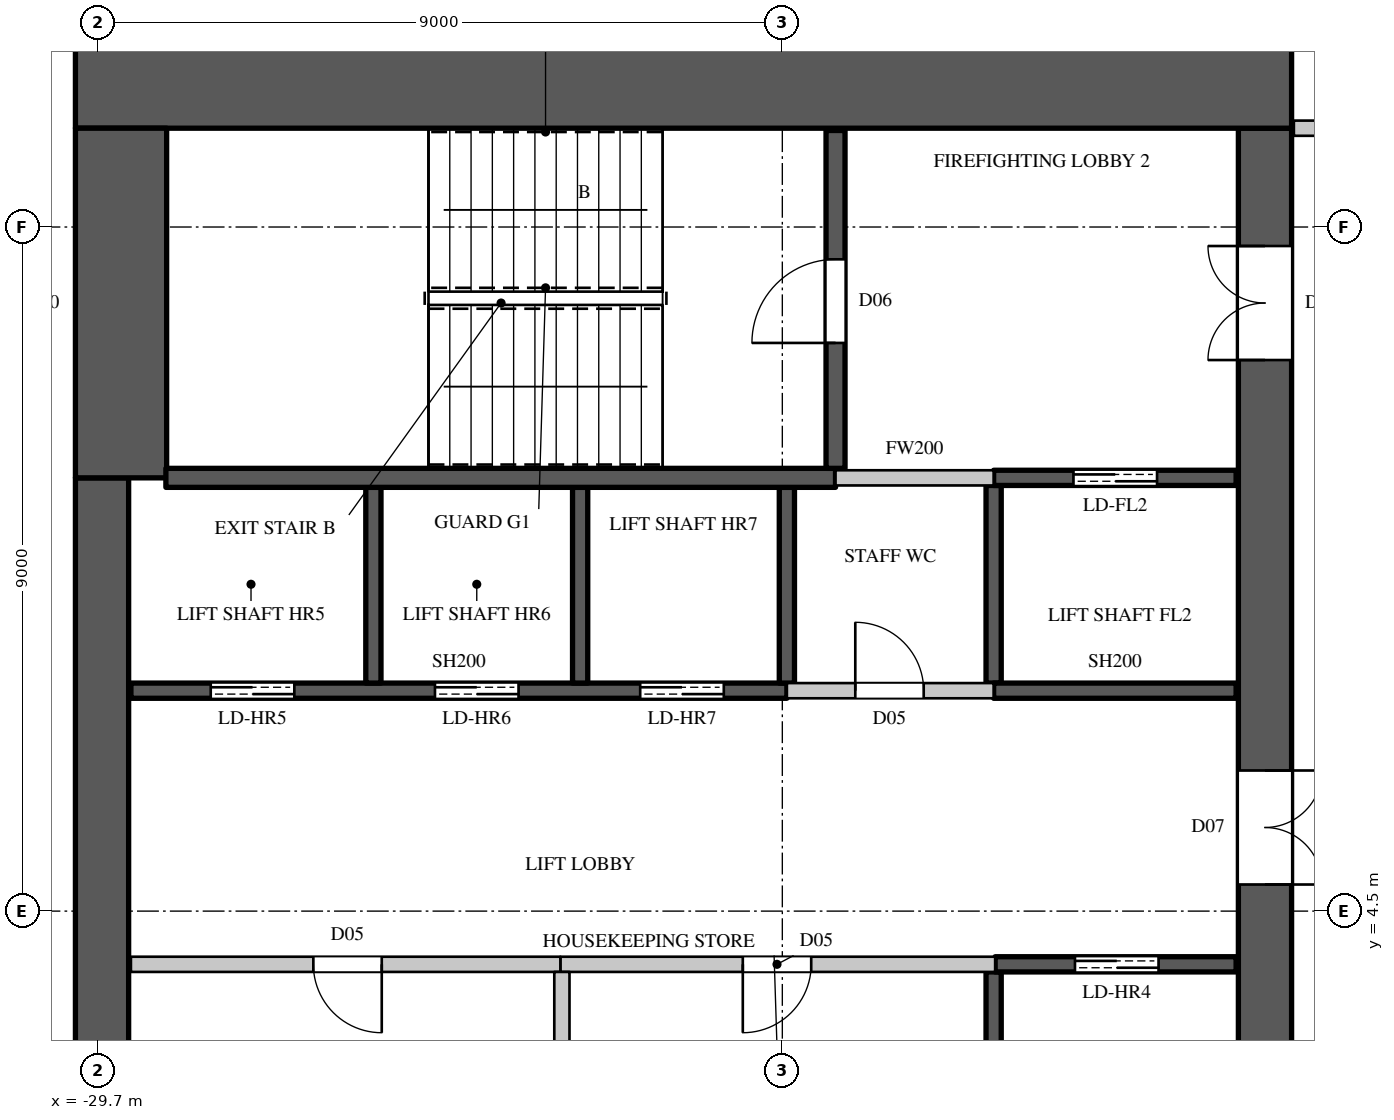
"""IFC4 building model, lengths in metres.
Left out: names, types, materials, properties, quantities, classifications, styles, units other than length and angle.
Written with IfcOpenShell. Run it as: python <this file> out.ifc"""

import sys

from ifc_helpers import new_model, si_unit, direction, frame, frame_2d, origin, place, context, subcontext, project, spatial, rectangle, extrude, element, fill, save


model = new_model("IFC4")
c1 = context("Model", 3, precision=1e-05, world=origin(), true_north=direction((0.0, 1.0)))
c2 = subcontext(c1, "Body", "Model", "MODEL_VIEW")
j1 = project(units=[si_unit("LENGTHUNIT", "METRE"), si_unit("PLANEANGLEUNIT", "RADIAN")], contexts=[c1])
p1 = place(None, origin())
s1 = spatial("IfcSite", under=j1, at=p1, CompositionType="ELEMENT")
p2 = place(p1, origin())
s2 = spatial("IfcBuilding", under=s1, at=p2, CompositionType="ELEMENT")
p3 = place(p2, frame((0.0, 0.0, 292.6)))
s3 = spatial("IfcBuildingStorey", under=s2, at=p3, CompositionType="ELEMENT", Elevation=292.6)
p4 = place(p3, frame((-30.0, 15.4, 0.0), z_axis=(0.0, 0.0, 1.0), x_axis=(1.0, 0.0, 0.0)))
e1 = element("IfcWall", 1, at=p4, inside=s3, PredefinedType="SHEAR", context=c2, shape_type="SweptSolid", body=[
    extrude(rectangle(XDim=16.0, YDim=1.2, at=frame_2d((8.0, 0.0))), origin(), (0.0, 0.0, 1.0), 4.1),
])
p5 = place(p3, frame((-14.35, -14.8, 0.0), z_axis=(0.0, 0.0, 1.0), x_axis=(0.0, 1.0, 0.0)))
e2 = element("IfcWall", 2, at=p5, inside=s3, PredefinedType="SHEAR", context=c2, shape_type="SweptSolid", body=[
    extrude(rectangle(XDim=29.6, YDim=0.7, at=frame_2d((14.8, 0.0))), origin(), (0.0, 0.0, 1.0), 4.1),
])
p6 = place(p5, frame((1.55, 0.0, 0.0)))
e3 = element("IfcOpeningElement", 3, at=p6, cuts=e2, PredefinedType="OPENING", context=c2, shape_type="SweptSolid", body=[
    extrude(rectangle(XDim=1.5, YDim=2.4, at=frame_2d((0.75, 1.2))), frame((0.0, 0.36, 0.0), z_axis=(0.0, -1.0, 0.0), x_axis=(1.0, 0.0, 0.0)), (0.0, 0.0, 1.0), 0.72),
])
p7 = place(p5, frame((26.55, 0.0, 0.0)))
e4 = element("IfcOpeningElement", 4, at=p7, cuts=e2, PredefinedType="OPENING", context=c2, shape_type="SweptSolid", body=[
    extrude(rectangle(XDim=1.5, YDim=2.4, at=frame_2d((0.75, 1.2))), frame((0.0, 0.36, 0.0), z_axis=(0.0, -1.0, 0.0), x_axis=(1.0, 0.0, 0.0)), (0.0, 0.0, 1.0), 0.72),
])
p8 = place(p5, frame((8.45, 0.0, 0.0)))
e5 = element("IfcOpeningElement", 5, at=p8, cuts=e2, PredefinedType="OPENING", context=c2, shape_type="SweptSolid", body=[
    extrude(rectangle(XDim=1.5, YDim=2.4, at=frame_2d((0.75, 1.2))), frame((0.0, 0.36, 0.0), z_axis=(0.0, -1.0, 0.0), x_axis=(1.0, 0.0, 0.0)), (0.0, 0.0, 1.0), 0.72),
])
p9 = place(p5, frame((19.65, 0.0, 0.0)))
e6 = element("IfcOpeningElement", 6, at=p9, cuts=e2, PredefinedType="OPENING", context=c2, shape_type="SweptSolid", body=[
    extrude(rectangle(XDim=1.5, YDim=2.4, at=frame_2d((0.75, 1.2))), frame((0.0, 0.36, 0.0), z_axis=(0.0, -1.0, 0.0), x_axis=(1.0, 0.0, 0.0)), (0.0, 0.0, 1.0), 0.72),
])
p10 = place(p5, frame((14.5, 0.0, 0.0)))
e7 = element("IfcOpeningElement", 7, at=p10, cuts=e2, PredefinedType="OPENING", context=c2, shape_type="SweptSolid", body=[
    extrude(rectangle(XDim=0.6, YDim=2.0, at=frame_2d((0.3, 1.0))), frame((0.0, 0.36, 0.0), z_axis=(0.0, -1.0, 0.0), x_axis=(1.0, 0.0, 0.0)), (0.0, 0.0, 1.0), 0.72),
])
p11 = place(p3, frame((-29.65, -10.2, 0.0), z_axis=(0.0, 0.0, 1.0), x_axis=(0.0, 1.0, 0.0)))
e8 = element("IfcWall", 8, at=p11, inside=s3, PredefinedType="SHEAR", context=c2, shape_type="SweptSolid", body=[
    extrude(rectangle(XDim=20.4, YDim=0.7, at=frame_2d((10.2, 0.0))), origin(), (0.0, 0.0, 1.0), 4.1),
])
p12 = place(p3, frame((-29.4, 10.2, 0.0), z_axis=(0.0, 0.0, 1.0), x_axis=(0.0, 1.0, 0.0)))
e9 = element("IfcWall", 9, at=p12, inside=s3, PredefinedType="SHEAR", context=c2, shape_type="SweptSolid", body=[
    extrude(rectangle(XDim=4.6, YDim=1.2, at=frame_2d((2.3, 0.0))), origin(), (0.0, 0.0, 1.0), 4.1),
])
p13 = place(p3, frame((-23.62, 3.8, 0.0), z_axis=(0.0, 0.0, 1.0), x_axis=(1.0, 0.0, 0.0)))
e10 = element("IfcWall", 10, at=p13, inside=s3, PredefinedType="PARTITIONING", context=c2, shape_type="SweptSolid", body=[
    extrude(rectangle(XDim=5.72, YDim=0.2, at=frame_2d((2.86, 0.0))), origin(), (0.0, 0.0, 1.0), 3.8),
])
p14 = place(p13, frame((2.4, 0.0, 0.0)))
e11 = element("IfcOpeningElement", 11, at=p14, cuts=e10, PredefinedType="OPENING", context=c2, shape_type="SweptSolid", body=[
    extrude(rectangle(XDim=0.9, YDim=2.2, at=frame_2d((0.45, 1.1))), frame((0.0, 0.11, 0.0), z_axis=(0.0, -1.0, 0.0), x_axis=(1.0, 0.0, 0.0)), (0.0, 0.0, 1.0), 0.22),
])
p15 = place(p3, frame((-20.64, 7.4, 0.0), z_axis=(0.0, 0.0, 1.0), x_axis=(1.0, 0.0, 0.0)))
e12 = element("IfcWall", 12, at=p15, inside=s3, PredefinedType="PARTITIONING", context=c2, shape_type="SweptSolid", body=[
    extrude(rectangle(XDim=2.72, YDim=0.2, at=frame_2d((1.36, 0.0))), origin(), (0.0, 0.0, 1.0), 3.8),
])
p16 = place(p15, frame((0.9, 0.0, 0.0)))
e13 = element("IfcOpeningElement", 13, at=p16, cuts=e12, PredefinedType="OPENING", context=c2, shape_type="SweptSolid", body=[
    extrude(rectangle(XDim=0.9, YDim=2.2, at=frame_2d((0.45, 1.1))), frame((0.0, 0.11, 0.0), z_axis=(0.0, -1.0, 0.0), x_axis=(1.0, 0.0, 0.0)), (0.0, 0.0, 1.0), 0.22),
])
p17 = place(p3, frame((-20.0, 10.2, 0.0), z_axis=(0.0, 0.0, 1.0), x_axis=(1.0, 0.0, 0.0)))
e14 = element("IfcWall", 14, at=p17, inside=s3, PredefinedType="PARTITIONING", context=c2, shape_type="SweptSolid", body=[
    extrude(rectangle(XDim=2.08, YDim=0.2, at=frame_2d((1.04, 0.0))), origin(), (0.0, 0.0, 1.0), 3.8),
])
p18 = place(p3, frame((-13.97, 14.8, 0.0), z_axis=(0.0, 0.0, 1.0), x_axis=(1.0, 0.0, 0.0)))
e15 = element("IfcWall", 15, at=p18, inside=s3, PredefinedType="PARTITIONING", context=c2, shape_type="SweptSolid", body=[
    extrude(rectangle(XDim=3.07, YDim=0.2, at=frame_2d((1.535, 0.0))), origin(), (0.0, 0.0, 1.0), 3.8),
])
p19 = place(p3, frame((-29.27, 3.8, 0.0), z_axis=(0.0, 0.0, 1.0), x_axis=(1.0, 0.0, 0.0)))
e16 = element("IfcWall", 16, at=p19, inside=s3, PredefinedType="PARTITIONING", context=c2, shape_type="SweptSolid", body=[
    extrude(rectangle(XDim=5.65, YDim=0.2, at=frame_2d((2.825, 0.0))), origin(), (0.0, 0.0, 1.0), 3.8),
])
p20 = place(p19, frame((2.4, 0.0, 0.0)))
e17 = element("IfcOpeningElement", 17, at=p20, cuts=e16, PredefinedType="OPENING", context=c2, shape_type="SweptSolid", body=[
    extrude(rectangle(XDim=0.9, YDim=2.2, at=frame_2d((0.45, 1.1))), frame((0.0, 0.11, 0.0), z_axis=(0.0, -1.0, 0.0), x_axis=(1.0, 0.0, 0.0)), (0.0, 0.0, 1.0), 0.22),
])
p21 = place(p3, frame((-23.6, 1.1, 0.0), z_axis=(0.0, 0.0, 1.0), x_axis=(0.0, 1.0, 0.0)))
e18 = element("IfcWall", 18, at=p21, inside=s3, PredefinedType="PARTITIONING", context=c2, shape_type="SweptSolid", body=[
    extrude(rectangle(XDim=2.6, YDim=0.2, at=frame_2d((1.3, 0.0))), origin(), (0.0, 0.0, 1.0), 3.8),
])
p22 = place(p3, frame((-29.27, 7.4, 0.0), z_axis=(0.0, 0.0, 1.0), x_axis=(1.0, 0.0, 0.0)))
e19 = element("IfcWall", 19, at=p22, inside=s3, PredefinedType="SHEAR", context=c2, shape_type="SweptSolid", body=[
    extrude(rectangle(XDim=8.63, YDim=0.2, at=frame_2d((4.315, 0.0))), origin(), (0.0, 0.0, 1.0), 3.8),
])
p23 = place(p22, frame((1.05, 0.0, 0.0)))
e20 = element("IfcOpeningElement", 20, at=p23, cuts=e19, PredefinedType="OPENING", context=c2, shape_type="SweptSolid", body=[
    extrude(rectangle(XDim=1.1, YDim=2.2, at=frame_2d((0.55, 1.1))), frame((0.0, 0.11, 0.0), z_axis=(0.0, -1.0, 0.0), x_axis=(1.0, 0.0, 0.0)), (0.0, 0.0, 1.0), 0.22),
])
p24 = place(p22, frame((4.0, 0.0, 0.0)))
e21 = element("IfcOpeningElement", 21, at=p24, cuts=e19, PredefinedType="OPENING", context=c2, shape_type="SweptSolid", body=[
    extrude(rectangle(XDim=1.1, YDim=2.2, at=frame_2d((0.55, 1.1))), frame((0.0, 0.11, 0.0), z_axis=(0.0, -1.0, 0.0), x_axis=(1.0, 0.0, 0.0)), (0.0, 0.0, 1.0), 0.22),
])
p25 = place(p22, frame((6.7, 0.0, 0.0)))
e22 = element("IfcOpeningElement", 22, at=p25, cuts=e19, PredefinedType="OPENING", context=c2, shape_type="SweptSolid", body=[
    extrude(rectangle(XDim=1.1, YDim=2.2, at=frame_2d((0.55, 1.1))), frame((0.0, 0.11, 0.0), z_axis=(0.0, -1.0, 0.0), x_axis=(1.0, 0.0, 0.0)), (0.0, 0.0, 1.0), 0.22),
])
for number, where, z_axis, x_axis in (
    (23, (-26.08, 7.5, 0.0), (0.0, 0.0, 1.0), (0.0, 1.0, 0.0)),
    (24, (-23.36, 7.5, 0.0), (0.0, 0.0, 1.0), (0.0, 1.0, 0.0)),
):
    element("IfcWall", number, at=place(p3, frame(where, z_axis=z_axis, x_axis=x_axis)), inside=s3, PredefinedType="SHEAR", context=c2, shape_type="SweptSolid", body=[
        extrude(rectangle(XDim=2.575, YDim=0.2, at=frame_2d((1.288, 0.0))), origin(), (0.0, 0.0, 1.0), 4.1),
    ])
p26 = place(p3, frame((-20.64, 7.5, 0.0), z_axis=(0.0, 0.0, 1.0), x_axis=(0.0, 1.0, 0.0)))
e25 = element("IfcWall", 25, at=p26, inside=s3, PredefinedType="SHEAR", context=c2, shape_type="SweptSolid", body=[
    extrude(rectangle(XDim=2.575, YDim=0.2, at=frame_2d((1.288, 0.0))), origin(), (0.0, 0.0, 1.0), 3.8),
])
p27 = place(p3, frame((-17.92, 1.1, 0.0), z_axis=(0.0, 0.0, 1.0), x_axis=(0.0, 1.0, 0.0)))
e26 = element("IfcWall", 26, at=p27, inside=s3, PredefinedType="SHEAR", context=c2, shape_type="SweptSolid", body=[
    extrude(rectangle(XDim=2.6, YDim=0.2, at=frame_2d((1.3, 0.0))), origin(), (0.0, 0.0, 1.0), 3.8),
])
p28 = place(p3, frame((-17.9, 3.8, 0.0), z_axis=(0.0, 0.0, 1.0), x_axis=(1.0, 0.0, 0.0)))
e27 = element("IfcWall", 27, at=p28, inside=s3, PredefinedType="SHEAR", context=c2, shape_type="SweptSolid", body=[
    extrude(rectangle(XDim=3.17, YDim=0.2, at=frame_2d((1.585, 0.0))), origin(), (0.0, 0.0, 1.0), 3.8),
])
p29 = place(p28, frame((1.05, 0.0, 0.0)))
e28 = element("IfcOpeningElement", 28, at=p29, cuts=e27, PredefinedType="OPENING", context=c2, shape_type="SweptSolid", body=[
    extrude(rectangle(XDim=1.1, YDim=2.2, at=frame_2d((0.55, 1.1))), frame((0.0, 0.11, 0.0), z_axis=(0.0, -1.0, 0.0), x_axis=(1.0, 0.0, 0.0)), (0.0, 0.0, 1.0), 0.22),
])
p30 = place(p3, frame((-17.92, 7.5, 0.0), z_axis=(0.0, 0.0, 1.0), x_axis=(0.0, 1.0, 0.0)))
e29 = element("IfcWall", 29, at=p30, inside=s3, PredefinedType="SHEAR", context=c2, shape_type="SweptSolid", body=[
    extrude(rectangle(XDim=2.6, YDim=0.2, at=frame_2d((1.3, 0.0))), origin(), (0.0, 0.0, 1.0), 3.8),
])
p31 = place(p3, frame((-17.92, 7.4, 0.0), z_axis=(0.0, 0.0, 1.0), x_axis=(1.0, 0.0, 0.0)))
e30 = element("IfcWall", 30, at=p31, inside=s3, PredefinedType="SHEAR", context=c2, shape_type="SweptSolid", body=[
    extrude(rectangle(XDim=3.19, YDim=0.2, at=frame_2d((1.595, 0.0))), origin(), (0.0, 0.0, 1.0), 3.8),
])
p32 = place(p3, frame((-17.92, 10.2, 0.0), z_axis=(0.0, 0.0, 1.0), x_axis=(1.0, 0.0, 0.0)))
e31 = element("IfcWall", 31, at=p32, inside=s3, PredefinedType="SHEAR", context=c2, shape_type="SweptSolid", body=[
    extrude(rectangle(XDim=3.19, YDim=0.2, at=frame_2d((1.595, 0.0))), origin(), (0.0, 0.0, 1.0), 3.8),
])
p33 = place(p32, frame((1.05, 0.0, 0.0)))
e32 = element("IfcOpeningElement", 32, at=p33, cuts=e31, PredefinedType="OPENING", context=c2, shape_type="SweptSolid", body=[
    extrude(rectangle(XDim=1.1, YDim=2.2, at=frame_2d((0.55, 1.1))), frame((0.0, 0.11, 0.0), z_axis=(0.0, -1.0, 0.0), x_axis=(1.0, 0.0, 0.0)), (0.0, 0.0, 1.0), 0.22),
])
p34 = place(p3, frame((-28.81, 10.2, 0.0), z_axis=(0.0, 0.0, 1.0), x_axis=(1.0, 0.0, 0.0)))
e33 = element("IfcWall", 33, at=p34, inside=s3, PredefinedType="SHEAR", context=c2, shape_type="SweptSolid", body=[
    extrude(rectangle(XDim=8.81, YDim=0.25, at=frame_2d((4.405, 0.0))), origin(), (0.0, 0.0, 1.0), 3.8),
])
p35 = place(p3, frame((-20.0, 10.325, 0.0), z_axis=(0.0, 0.0, 1.0), x_axis=(0.0, 1.0, 0.0)))
e34 = element("IfcWall", 34, at=p35, inside=s3, PredefinedType="SHEAR", context=c2, shape_type="SweptSolid", body=[
    extrude(rectangle(XDim=4.445, YDim=0.25, at=frame_2d((2.223, 0.0))), origin(), (0.0, 0.0, 1.0), 3.8),
])
p36 = place(p35, frame((1.65, 0.0, 0.0)))
e35 = element("IfcOpeningElement", 35, at=p36, cuts=e34, PredefinedType="OPENING", context=c2, shape_type="SweptSolid", body=[
    extrude(rectangle(XDim=1.1, YDim=2.2, at=frame_2d((0.55, 1.1))), frame((0.0, 0.135, 0.0), z_axis=(0.0, -1.0, 0.0), x_axis=(1.0, 0.0, 0.0)), (0.0, 0.0, 1.0), 0.27),
])
p37 = place(p36, origin())
e36 = element("IfcDoor", 36, at=p37, inside=s3, OperationType="SINGLE_SWING_LEFT", PredefinedType="DOOR", context=c2, shape_type="SweptSolid", body=[
    extrude(rectangle(XDim=1.1, YDim=2.2, at=frame_2d((0.55, 1.1))), frame((0.0, 0.025, 0.0), z_axis=(0.0, -1.0, 0.0), x_axis=(1.0, 0.0, 0.0)), (0.0, 0.0, 1.0), 0.05),
])
fill(e35, e36)
p38 = place(p20, origin())
e37 = element("IfcDoor", 37, at=p38, inside=s3, OperationType="SINGLE_SWING_LEFT", PredefinedType="DOOR", context=c2, shape_type="SweptSolid", body=[
    extrude(rectangle(XDim=0.9, YDim=2.2, at=frame_2d((0.45, 1.1))), frame((0.0, 0.025, 0.0), z_axis=(0.0, -1.0, 0.0), x_axis=(1.0, 0.0, 0.0)), (0.0, 0.0, 1.0), 0.05),
])
fill(e17, e37)
p39 = place(p14, origin())
e38 = element("IfcDoor", 38, at=p39, inside=s3, OperationType="SINGLE_SWING_RIGHT", PredefinedType="DOOR", context=c2, shape_type="SweptSolid", body=[
    extrude(rectangle(XDim=0.9, YDim=2.2, at=frame_2d((0.45, 1.1))), frame((0.0, 0.025, 0.0), z_axis=(0.0, -1.0, 0.0), x_axis=(1.0, 0.0, 0.0)), (0.0, 0.0, 1.0), 0.05),
])
fill(e11, e38)
p40 = place(p16, origin())
e39 = element("IfcDoor", 39, at=p40, inside=s3, OperationType="SINGLE_SWING_LEFT", PredefinedType="DOOR", context=c2, shape_type="SweptSolid", body=[
    extrude(rectangle(XDim=0.9, YDim=2.2, at=frame_2d((0.45, 1.1))), frame((0.0, 0.025, 0.0), z_axis=(0.0, -1.0, 0.0), x_axis=(1.0, 0.0, 0.0)), (0.0, 0.0, 1.0), 0.05),
])
fill(e13, e39)
p41 = place(p29, origin())
e40 = element("IfcDoor", 40, at=p41, inside=s3, OperationType="DOUBLE_DOOR_SLIDING", PredefinedType="DOOR", context=c2, shape_type="SweptSolid", body=[
    extrude(rectangle(XDim=1.1, YDim=2.2, at=frame_2d((0.55, 1.1))), frame((0.0, 0.025, 0.0), z_axis=(0.0, -1.0, 0.0), x_axis=(1.0, 0.0, 0.0)), (0.0, 0.0, 1.0), 0.05),
])
fill(e28, e40)
p42 = place(p23, origin())
e41 = element("IfcDoor", 41, at=p42, inside=s3, OperationType="DOUBLE_DOOR_SLIDING", PredefinedType="DOOR", context=c2, shape_type="SweptSolid", body=[
    extrude(rectangle(XDim=1.1, YDim=2.2, at=frame_2d((0.55, 1.1))), frame((0.0, 0.025, 0.0), z_axis=(0.0, -1.0, 0.0), x_axis=(1.0, 0.0, 0.0)), (0.0, 0.0, 1.0), 0.05),
])
fill(e20, e41)
p43 = place(p24, origin())
e42 = element("IfcDoor", 42, at=p43, inside=s3, OperationType="DOUBLE_DOOR_SLIDING", PredefinedType="DOOR", context=c2, shape_type="SweptSolid", body=[
    extrude(rectangle(XDim=1.1, YDim=2.2, at=frame_2d((0.55, 1.1))), frame((0.0, 0.025, 0.0), z_axis=(0.0, -1.0, 0.0), x_axis=(1.0, 0.0, 0.0)), (0.0, 0.0, 1.0), 0.05),
])
fill(e21, e42)
p44 = place(p25, origin())
e43 = element("IfcDoor", 43, at=p44, inside=s3, OperationType="DOUBLE_DOOR_SLIDING", PredefinedType="DOOR", context=c2, shape_type="SweptSolid", body=[
    extrude(rectangle(XDim=1.1, YDim=2.2, at=frame_2d((0.55, 1.1))), frame((0.0, 0.025, 0.0), z_axis=(0.0, -1.0, 0.0), x_axis=(1.0, 0.0, 0.0)), (0.0, 0.0, 1.0), 0.05),
])
fill(e22, e43)
p45 = place(p33, origin())
e44 = element("IfcDoor", 44, at=p45, inside=s3, OperationType="DOUBLE_DOOR_SLIDING", PredefinedType="DOOR", context=c2, shape_type="SweptSolid", body=[
    extrude(rectangle(XDim=1.1, YDim=2.2, at=frame_2d((0.55, 1.1))), frame((0.0, 0.025, 0.0), z_axis=(0.0, -1.0, 0.0), x_axis=(1.0, 0.0, 0.0)), (0.0, 0.0, 1.0), 0.05),
])
fill(e32, e44)
p46 = place(p7, origin())
e45 = element("IfcDoor", 45, at=p46, inside=s3, OperationType="DOUBLE_DOOR_SINGLE_SWING", PredefinedType="DOOR", context=c2, shape_type="SweptSolid", body=[
    extrude(rectangle(XDim=1.5, YDim=2.4, at=frame_2d((0.75, 1.2))), frame((0.0, 0.345, 0.0), z_axis=(0.0, -1.0, 0.0), x_axis=(1.0, 0.0, 0.0)), (0.0, 0.0, 1.0), 0.05),
])
fill(e4, e45)
p47 = place(p9, origin())
e46 = element("IfcDoor", 46, at=p47, inside=s3, OperationType="DOUBLE_DOOR_SINGLE_SWING", PredefinedType="DOOR", context=c2, shape_type="SweptSolid", body=[
    extrude(rectangle(XDim=1.5, YDim=2.4, at=frame_2d((0.75, 1.2))), frame((0.0, -0.295, 0.0), z_axis=(0.0, -1.0, 0.0), x_axis=(1.0, 0.0, 0.0)), (0.0, 0.0, 1.0), 0.05),
])
fill(e6, e46)
save(model, sys.argv[1])
